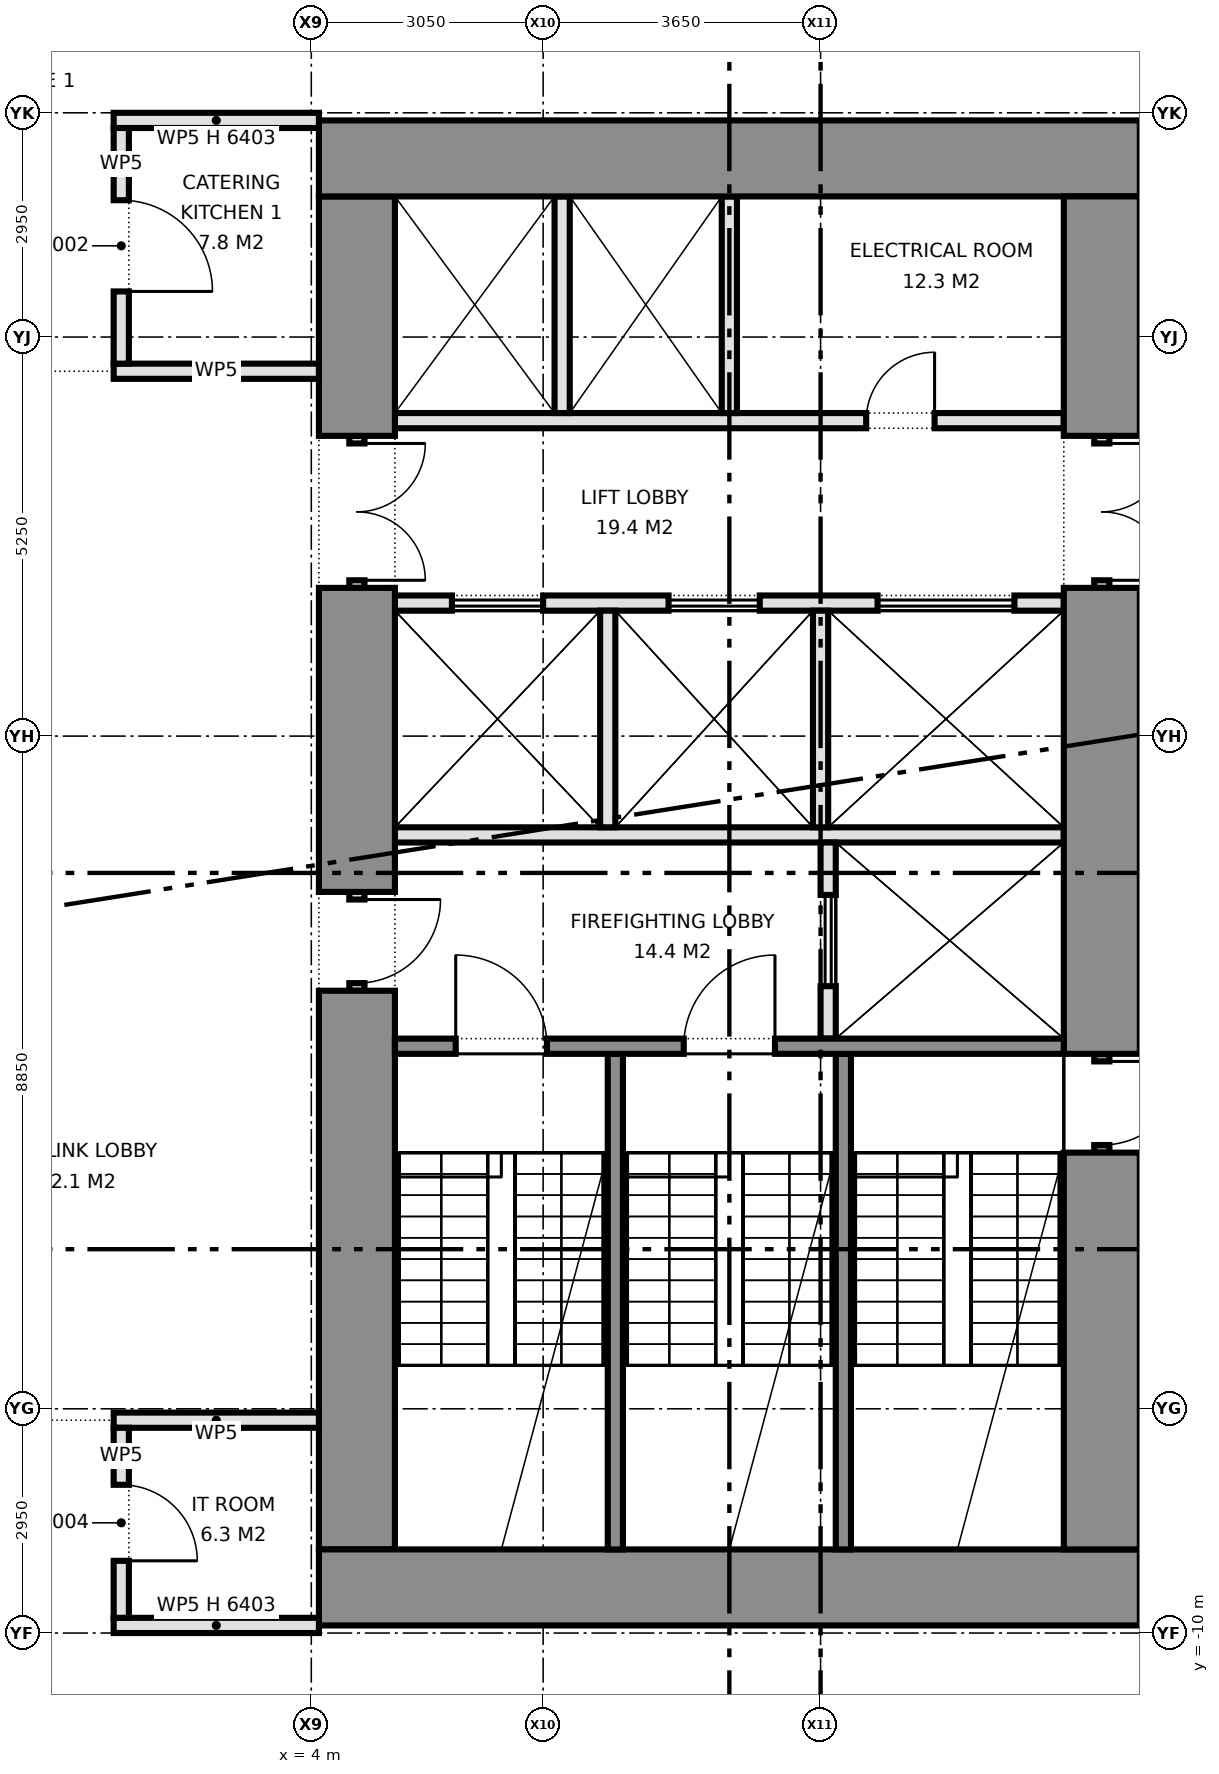
"""IFC4 building model, lengths in metres.
Left out: names, types, materials, properties, quantities, classifications, styles, units other than length and angle.
Written with IfcOpenShell. Run it as: python <this file> out.ifc"""

import sys

from ifc_helpers import new_model, si_unit, direction, frame, frame_2d, origin, place, context, subcontext, project, spatial, rectangle, extrude, element, fill, save


model = new_model("IFC4")
c1 = context("Model", 3, precision=1e-05, world=origin(), true_north=direction((0.0, 1.0)))
c2 = subcontext(c1, "Body", "Model", "MODEL_VIEW")
j1 = project(units=[si_unit("LENGTHUNIT", "METRE"), si_unit("PLANEANGLEUNIT", "RADIAN")], contexts=[c1])
p1 = place(None, origin())
s1 = spatial("IfcSite", under=j1, at=p1, CompositionType="ELEMENT")
p2 = place(p1, origin())
s2 = spatial("IfcBuilding", under=s1, at=p2, CompositionType="ELEMENT")
p3 = place(p2, frame((0.0, 0.0, 112.8)))
s3 = spatial("IfcBuildingStorey", under=s2, at=p3, CompositionType="ELEMENT", Elevation=112.8)
for number, where, z_axis, x_axis in (
    (1, (14.9, 9.4, 0.0), (0.0, 0.0, 1.0), (-1.0, 0.0, 0.0)),
    (2, (14.9, -9.4, 0.0), (0.0, 0.0, 1.0), (-1.0, 0.0, 0.0)),
):
    element("IfcWall", number, at=place(p3, frame(where, z_axis=z_axis, x_axis=x_axis)), inside=s3, PredefinedType="SHEAR", context=c2, shape_type="SweptSolid", body=[
        extrude(rectangle(XDim=10.8, YDim=1.0, at=frame_2d((5.4, 0.0))), origin(), (0.0, 0.0, 1.0), 7.35),
    ])
p4 = place(p3, frame((14.4, 8.9, 0.0), z_axis=(0.0, 0.0, 1.0), x_axis=(0.0, -1.0, 0.0)))
e3 = element("IfcWall", 3, at=p4, inside=s3, PredefinedType="SHEAR", context=c2, shape_type="SweptSolid", body=[
    extrude(rectangle(XDim=3.15, YDim=1.0, at=frame_2d((1.575, 0.0))), origin(), (0.0, 0.0, 1.0), 7.35),
])
p5 = place(p3, frame((14.4, 5.75, 0.0), z_axis=(0.0, 0.0, 1.0), x_axis=(0.0, -1.0, 0.0)))
e4 = element("IfcWall", 4, at=p5, inside=s3, PredefinedType="PARTITIONING", context=c2, shape_type="SweptSolid", body=[
    extrude(rectangle(XDim=2.0, YDim=0.2, at=frame_2d((1.0, 0.0))), origin(), (0.0, 0.0, 1.0), 2.4),
])
p6 = place(p5, frame((0.1, 0.0, 0.0)))
e5 = element("IfcOpeningElement", 5, at=p6, cuts=e4, PredefinedType="OPENING", context=c2, shape_type="SweptSolid", body=[
    extrude(rectangle(XDim=1.8, YDim=2.1, at=frame_2d((0.9, 1.05))), frame((0.0, 0.11, 0.0), z_axis=(0.0, -1.0, 0.0), x_axis=(1.0, 0.0, 0.0)), (0.0, 0.0, 1.0), 0.22),
])
p7 = place(p3, frame((14.4, 3.75, 0.0), z_axis=(0.0, 0.0, 1.0), x_axis=(0.0, -1.0, 0.0)))
e6 = element("IfcWall", 6, at=p7, inside=s3, PredefinedType="SHEAR", context=c2, shape_type="SweptSolid", body=[
    extrude(rectangle(XDim=6.13, YDim=1.0, at=frame_2d((3.065, 0.0))), origin(), (0.0, 0.0, 1.0), 7.35),
])
p8 = place(p3, frame((14.4, -2.38, 0.0), z_axis=(0.0, 0.0, 1.0), x_axis=(0.0, -1.0, 0.0)))
e7 = element("IfcWall", 7, at=p8, inside=s3, PredefinedType="SHEAR", context=c2, shape_type="SweptSolid", body=[
    extrude(rectangle(XDim=1.3, YDim=0.2, at=frame_2d((0.65, 0.0))), origin(), (0.0, 0.0, 1.0), 2.4),
])
p9 = place(p8, frame((0.1, 0.0, 0.0)))
e8 = element("IfcOpeningElement", 8, at=p9, cuts=e7, PredefinedType="OPENING", context=c2, shape_type="SweptSolid", body=[
    extrude(rectangle(XDim=1.1, YDim=2.1, at=frame_2d((0.55, 1.05))), frame((0.0, 0.11, 0.0), z_axis=(0.0, -1.0, 0.0), x_axis=(1.0, 0.0, 0.0)), (0.0, 0.0, 1.0), 0.22),
])
p10 = place(p3, frame((14.4, -3.68, 0.0), z_axis=(0.0, 0.0, 1.0), x_axis=(0.0, -1.0, 0.0)))
e9 = element("IfcWall", 9, at=p10, inside=s3, PredefinedType="SHEAR", context=c2, shape_type="SweptSolid", body=[
    extrude(rectangle(XDim=5.22, YDim=1.0, at=frame_2d((2.61, 0.0))), origin(), (0.0, 0.0, 1.0), 7.35),
])
p11 = place(p3, frame((4.6, 8.9, 0.0), z_axis=(0.0, 0.0, 1.0), x_axis=(0.0, -1.0, 0.0)))
e10 = element("IfcWall", 10, at=p11, inside=s3, PredefinedType="SHEAR", context=c2, shape_type="SweptSolid", body=[
    extrude(rectangle(XDim=3.15, YDim=1.0, at=frame_2d((1.575, 0.0))), origin(), (0.0, 0.0, 1.0), 7.35),
])
p12 = place(p3, frame((4.6, 5.75, 0.0), z_axis=(0.0, 0.0, 1.0), x_axis=(0.0, -1.0, 0.0)))
e11 = element("IfcWall", 11, at=p12, inside=s3, PredefinedType="PARTITIONING", context=c2, shape_type="SweptSolid", body=[
    extrude(rectangle(XDim=2.0, YDim=0.2, at=frame_2d((1.0, 0.0))), origin(), (0.0, 0.0, 1.0), 2.4),
])
p13 = place(p12, frame((0.1, 0.0, 0.0)))
e12 = element("IfcOpeningElement", 12, at=p13, cuts=e11, PredefinedType="OPENING", context=c2, shape_type="SweptSolid", body=[
    extrude(rectangle(XDim=1.8, YDim=2.1, at=frame_2d((0.9, 1.05))), frame((0.0, 0.11, 0.0), z_axis=(0.0, -1.0, 0.0), x_axis=(1.0, 0.0, 0.0)), (0.0, 0.0, 1.0), 0.22),
])
p14 = place(p3, frame((4.6, 3.75, 0.0), z_axis=(0.0, 0.0, 1.0), x_axis=(0.0, -1.0, 0.0)))
e13 = element("IfcWall", 13, at=p14, inside=s3, PredefinedType="SHEAR", context=c2, shape_type="SweptSolid", body=[
    extrude(rectangle(XDim=4.0, YDim=1.0, at=frame_2d((2.0, 0.0))), origin(), (0.0, 0.0, 1.0), 7.35),
])
p15 = place(p3, frame((4.6, -0.25, 0.0), z_axis=(0.0, 0.0, 1.0), x_axis=(0.0, -1.0, 0.0)))
e14 = element("IfcWall", 14, at=p15, inside=s3, PredefinedType="PARTITIONING", context=c2, shape_type="SweptSolid", body=[
    extrude(rectangle(XDim=1.3, YDim=0.2, at=frame_2d((0.65, 0.0))), origin(), (0.0, 0.0, 1.0), 2.4),
])
p16 = place(p15, frame((0.1, 0.0, 0.0)))
e15 = element("IfcOpeningElement", 15, at=p16, cuts=e14, PredefinedType="OPENING", context=c2, shape_type="SweptSolid", body=[
    extrude(rectangle(XDim=1.1, YDim=2.1, at=frame_2d((0.55, 1.05))), frame((0.0, 0.11, 0.0), z_axis=(0.0, -1.0, 0.0), x_axis=(1.0, 0.0, 0.0)), (0.0, 0.0, 1.0), 0.22),
])
p17 = place(p3, frame((4.6, -1.55, 0.0), z_axis=(0.0, 0.0, 1.0), x_axis=(0.0, -1.0, 0.0)))
e16 = element("IfcWall", 16, at=p17, inside=s3, PredefinedType="SHEAR", context=c2, shape_type="SweptSolid", body=[
    extrude(rectangle(XDim=7.35, YDim=1.0, at=frame_2d((3.675, 0.0))), origin(), (0.0, 0.0, 1.0), 7.35),
])
p18 = place(p3, frame((13.9, 5.95, 0.0), z_axis=(0.0, 0.0, 1.0), x_axis=(-1.0, 0.0, 0.0)))
e17 = element("IfcWall", 17, at=p18, inside=s3, PredefinedType="PARTITIONING", context=c2, shape_type="SweptSolid", body=[
    extrude(rectangle(XDim=8.8, YDim=0.2, at=frame_2d((4.4, 0.0))), origin(), (0.0, 0.0, 1.0), 7.35),
])
p19 = place(p18, frame((1.7, 0.0, 0.0)))
e18 = element("IfcOpeningElement", 18, at=p19, cuts=e17, PredefinedType="OPENING", context=c2, shape_type="SweptSolid", body=[
    extrude(rectangle(XDim=0.9, YDim=2.1, at=frame_2d((0.45, 1.05))), frame((0.0, 0.11, 0.0), z_axis=(0.0, -1.0, 0.0), x_axis=(1.0, 0.0, 0.0)), (0.0, 0.0, 1.0), 0.22),
])
p20 = place(p3, frame((13.9, 3.55, 0.0), z_axis=(0.0, 0.0, 1.0), x_axis=(-1.0, 0.0, 0.0)))
e19 = element("IfcWall", 19, at=p20, inside=s3, PredefinedType="PARTITIONING", context=c2, shape_type="SweptSolid", body=[
    extrude(rectangle(XDim=8.8, YDim=0.2, at=frame_2d((4.4, 0.0))), origin(), (0.0, 0.0, 1.0), 7.35),
])
p21 = place(p20, frame((0.65, 0.0, 0.0)))
e20 = element("IfcOpeningElement", 20, at=p21, cuts=e19, PredefinedType="OPENING", context=c2, shape_type="SweptSolid", body=[
    extrude(rectangle(XDim=1.8, YDim=2.1, at=frame_2d((0.9, 1.05))), frame((0.0, 0.11, 0.0), z_axis=(0.0, -1.0, 0.0), x_axis=(1.0, 0.0, 0.0)), (0.0, 0.0, 1.0), 0.22),
])
p22 = place(p20, frame((4.0, 0.0, 0.0)))
e21 = element("IfcOpeningElement", 21, at=p22, cuts=e19, PredefinedType="OPENING", context=c2, shape_type="SweptSolid", body=[
    extrude(rectangle(XDim=1.2, YDim=2.1, at=frame_2d((0.6, 1.05))), frame((0.0, 0.11, 0.0), z_axis=(0.0, -1.0, 0.0), x_axis=(1.0, 0.0, 0.0)), (0.0, 0.0, 1.0), 0.22),
])
p23 = place(p20, frame((6.85, 0.0, 0.0)))
e22 = element("IfcOpeningElement", 22, at=p23, cuts=e19, PredefinedType="OPENING", context=c2, shape_type="SweptSolid", body=[
    extrude(rectangle(XDim=1.2, YDim=2.1, at=frame_2d((0.6, 1.05))), frame((0.0, 0.11, 0.0), z_axis=(0.0, -1.0, 0.0), x_axis=(1.0, 0.0, 0.0)), (0.0, 0.0, 1.0), 0.22),
])
p24 = place(p3, frame((13.9, 0.5, 0.0), z_axis=(0.0, 0.0, 1.0), x_axis=(-1.0, 0.0, 0.0)))
e23 = element("IfcWall", 23, at=p24, inside=s3, PredefinedType="PARTITIONING", context=c2, shape_type="SweptSolid", body=[
    extrude(rectangle(XDim=8.8, YDim=0.2, at=frame_2d((4.4, 0.0))), origin(), (0.0, 0.0, 1.0), 7.35),
])
p25 = place(p3, frame((10.8, 0.4, 0.0), z_axis=(0.0, 0.0, 1.0), x_axis=(0.0, -1.0, 0.0)))
e24 = element("IfcWall", 24, at=p25, inside=s3, PredefinedType="PARTITIONING", context=c2, shape_type="SweptSolid", body=[
    extrude(rectangle(XDim=2.58, YDim=0.2, at=frame_2d((1.29, 0.0))), origin(), (0.0, 0.0, 1.0), 7.35),
])
p26 = place(p25, frame((0.69, 0.0, 0.0)))
e25 = element("IfcOpeningElement", 25, at=p26, cuts=e24, PredefinedType="OPENING", context=c2, shape_type="SweptSolid", body=[
    extrude(rectangle(XDim=1.2, YDim=2.1, at=frame_2d((0.6, 1.05))), frame((0.0, 0.11, 0.0), z_axis=(0.0, -1.0, 0.0), x_axis=(1.0, 0.0, 0.0)), (0.0, 0.0, 1.0), 0.22),
])
p27 = place(p3, frame((13.9, -2.28, 0.0), z_axis=(0.0, 0.0, 1.0), x_axis=(-1.0, 0.0, 0.0)))
e26 = element("IfcWall", 26, at=p27, inside=s3, PredefinedType="SHEAR", context=c2, shape_type="SweptSolid", body=[
    extrude(rectangle(XDim=8.8, YDim=0.2, at=frame_2d((4.4, 0.0))), origin(), (0.0, 0.0, 1.0), 7.35),
])
p28 = place(p27, frame((3.8, 0.0, 0.0)))
e27 = element("IfcOpeningElement", 27, at=p28, cuts=e26, PredefinedType="OPENING", context=c2, shape_type="SweptSolid", body=[
    extrude(rectangle(XDim=1.2, YDim=2.1, at=frame_2d((0.6, 1.05))), frame((0.0, 0.11, 0.0), z_axis=(0.0, -1.0, 0.0), x_axis=(1.0, 0.0, 0.0)), (0.0, 0.0, 1.0), 0.22),
])
p29 = place(p27, frame((6.8, 0.0, 0.0)))
e28 = element("IfcOpeningElement", 28, at=p29, cuts=e26, PredefinedType="OPENING", context=c2, shape_type="SweptSolid", body=[
    extrude(rectangle(XDim=1.2, YDim=2.1, at=frame_2d((0.6, 1.05))), frame((0.0, 0.11, 0.0), z_axis=(0.0, -1.0, 0.0), x_axis=(1.0, 0.0, 0.0)), (0.0, 0.0, 1.0), 0.22),
])
for number, where, z_axis, x_axis in (
    (29, (11.0, -2.38, 0.0), (0.0, 0.0, 1.0), (0.0, -1.0, 0.0)),
    (30, (8.0, -2.38, 0.0), (0.0, 0.0, 1.0), (0.0, -1.0, 0.0)),
):
    element("IfcWall", number, at=place(p3, frame(where, z_axis=z_axis, x_axis=x_axis)), inside=s3, PredefinedType="SHEAR", context=c2, shape_type="SweptSolid", body=[
        extrude(rectangle(XDim=6.52, YDim=0.2, at=frame_2d((3.26, 0.0))), origin(), (0.0, 0.0, 1.0), 7.35),
    ])
for number, where, z_axis, x_axis in (
    (31, (9.5, 8.9, 0.0), (0.0, 0.0, 1.0), (0.0, -1.0, 0.0)),
    (32, (7.3, 8.9, 0.0), (0.0, 0.0, 1.0), (0.0, -1.0, 0.0)),
    (33, (10.7, 3.45, 0.0), (0.0, 0.0, 1.0), (0.0, -1.0, 0.0)),
    (34, (7.9, 3.45, 0.0), (0.0, 0.0, 1.0), (0.0, -1.0, 0.0)),
):
    element("IfcWall", number, at=place(p3, frame(where, z_axis=z_axis, x_axis=x_axis)), inside=s3, PredefinedType="PARTITIONING", context=c2, shape_type="SweptSolid", body=[
        extrude(rectangle(XDim=2.85, YDim=0.2, at=frame_2d((1.425, 0.0))), origin(), (0.0, 0.0, 1.0), 7.35),
    ])
p30 = place(p3, frame((1.4, -9.9, 0.0), z_axis=(0.0, 0.0, 1.0), x_axis=(1.0, 0.0, 0.0)))
e35 = element("IfcWall", 35, at=p30, inside=s3, PredefinedType="PARTITIONING", context=c2, shape_type="SweptSolid", body=[
    extrude(rectangle(XDim=2.7, YDim=0.2, at=frame_2d((1.35, 0.0))), origin(), (0.0, 0.0, 1.0), 6.403),
])
for number, where, z_axis, x_axis in (
    (36, (1.4, -7.2, 0.0), (0.0, 0.0, 1.0), (1.0, 0.0, 0.0)),
    (37, (1.4, 6.6, 0.0), (0.0, 0.0, 1.0), (1.0, 0.0, 0.0)),
):
    element("IfcWall", number, at=place(p3, frame(where, z_axis=z_axis, x_axis=x_axis)), inside=s3, PredefinedType="PARTITIONING", context=c2, shape_type="SweptSolid", body=[
        extrude(rectangle(XDim=2.7, YDim=0.2, at=frame_2d((1.35, 0.0))), origin(), (0.0, 0.0, 1.0), 7.35),
    ])
p31 = place(p3, frame((1.4, 9.9, 0.0), z_axis=(0.0, 0.0, 1.0), x_axis=(1.0, 0.0, 0.0)))
e38 = element("IfcWall", 38, at=p31, inside=s3, PredefinedType="PARTITIONING", context=c2, shape_type="SweptSolid", body=[
    extrude(rectangle(XDim=2.7, YDim=0.2, at=frame_2d((1.35, 0.0))), origin(), (0.0, 0.0, 1.0), 6.403),
])
p32 = place(p3, frame((1.5, -9.8, 0.0), z_axis=(0.0, 0.0, 1.0), x_axis=(0.0, 1.0, 0.0)))
e39 = element("IfcWall", 39, at=p32, inside=s3, PredefinedType="PARTITIONING", context=c2, shape_type="SweptSolid", body=[
    extrude(rectangle(XDim=2.5, YDim=0.2, at=frame_2d((1.25, 0.0))), origin(), (0.0, 0.0, 1.0), 7.35),
])
p33 = place(p32, frame((0.75, 0.0, 0.0)))
e40 = element("IfcOpeningElement", 40, at=p33, cuts=e39, PredefinedType="OPENING", context=c2, shape_type="SweptSolid", body=[
    extrude(rectangle(XDim=1.0, YDim=2.1, at=frame_2d((0.5, 1.05))), frame((0.0, 0.11, 0.0), z_axis=(0.0, -1.0, 0.0), x_axis=(1.0, 0.0, 0.0)), (0.0, 0.0, 1.0), 0.22),
])
p34 = place(p3, frame((1.5, 6.7, 0.0), z_axis=(0.0, 0.0, 1.0), x_axis=(0.0, 1.0, 0.0)))
e41 = element("IfcWall", 41, at=p34, inside=s3, PredefinedType="PARTITIONING", context=c2, shape_type="SweptSolid", body=[
    extrude(rectangle(XDim=3.1, YDim=0.2, at=frame_2d((1.55, 0.0))), origin(), (0.0, 0.0, 1.0), 7.35),
])
p35 = place(p34, frame((0.95, 0.0, 0.0)))
e42 = element("IfcOpeningElement", 42, at=p35, cuts=e41, PredefinedType="OPENING", context=c2, shape_type="SweptSolid", body=[
    extrude(rectangle(XDim=1.2, YDim=2.1, at=frame_2d((0.6, 1.05))), frame((0.0, 0.11, 0.0), z_axis=(0.0, -1.0, 0.0), x_axis=(1.0, 0.0, 0.0)), (0.0, 0.0, 1.0), 0.22),
])
p36 = place(p6, origin())
e43 = element("IfcDoor", 43, at=p36, inside=s3, OperationType="DOUBLE_DOOR_SINGLE_SWING", PredefinedType="DOOR", context=c2, shape_type="SweptSolid", body=[
    extrude(rectangle(XDim=1.8, YDim=2.1, at=frame_2d((0.9, 1.05))), frame((0.0, 0.025, 0.0), z_axis=(0.0, -1.0, 0.0), x_axis=(1.0, 0.0, 0.0)), (0.0, 0.0, 1.0), 0.05),
])
fill(e5, e43)
p37 = place(p9, origin())
e44 = element("IfcDoor", 44, at=p37, inside=s3, OperationType="SINGLE_SWING_LEFT", PredefinedType="DOOR", context=c2, shape_type="SweptSolid", body=[
    extrude(rectangle(XDim=1.1, YDim=2.1, at=frame_2d((0.55, 1.05))), frame((0.0, 0.025, 0.0), z_axis=(0.0, -1.0, 0.0), x_axis=(1.0, 0.0, 0.0)), (0.0, 0.0, 1.0), 0.05),
])
fill(e8, e44)
p38 = place(p13, origin())
e45 = element("IfcDoor", 45, at=p38, inside=s3, OperationType="DOUBLE_DOOR_SINGLE_SWING", PredefinedType="DOOR", context=c2, shape_type="SweptSolid", body=[
    extrude(rectangle(XDim=1.8, YDim=2.1, at=frame_2d((0.9, 1.05))), frame((0.0, 0.025, 0.0), z_axis=(0.0, -1.0, 0.0), x_axis=(1.0, 0.0, 0.0)), (0.0, 0.0, 1.0), 0.05),
])
fill(e12, e45)
p39 = place(p16, origin())
e46 = element("IfcDoor", 46, at=p39, inside=s3, OperationType="SINGLE_SWING_LEFT", PredefinedType="DOOR", context=c2, shape_type="SweptSolid", body=[
    extrude(rectangle(XDim=1.1, YDim=2.1, at=frame_2d((0.55, 1.05))), frame((0.0, 0.025, 0.0), z_axis=(0.0, -1.0, 0.0), x_axis=(1.0, 0.0, 0.0)), (0.0, 0.0, 1.0), 0.05),
])
fill(e15, e46)
p40 = place(p21, origin())
e47 = element("IfcDoor", 47, at=p40, inside=s3, OperationType="DOUBLE_DOOR_SLIDING", PredefinedType="DOOR", context=c2, shape_type="SweptSolid", body=[
    extrude(rectangle(XDim=1.8, YDim=2.1, at=frame_2d((0.9, 1.05))), frame((0.0, 0.025, 0.0), z_axis=(0.0, -1.0, 0.0), x_axis=(1.0, 0.0, 0.0)), (0.0, 0.0, 1.0), 0.05),
])
fill(e20, e47)
p41 = place(p22, origin())
e48 = element("IfcDoor", 48, at=p41, inside=s3, OperationType="DOUBLE_DOOR_SLIDING", PredefinedType="DOOR", context=c2, shape_type="SweptSolid", body=[
    extrude(rectangle(XDim=1.2, YDim=2.1, at=frame_2d((0.6, 1.05))), frame((0.0, 0.025, 0.0), z_axis=(0.0, -1.0, 0.0), x_axis=(1.0, 0.0, 0.0)), (0.0, 0.0, 1.0), 0.05),
])
fill(e21, e48)
p42 = place(p23, origin())
e49 = element("IfcDoor", 49, at=p42, inside=s3, OperationType="DOUBLE_DOOR_SLIDING", PredefinedType="DOOR", context=c2, shape_type="SweptSolid", body=[
    extrude(rectangle(XDim=1.2, YDim=2.1, at=frame_2d((0.6, 1.05))), frame((0.0, 0.025, 0.0), z_axis=(0.0, -1.0, 0.0), x_axis=(1.0, 0.0, 0.0)), (0.0, 0.0, 1.0), 0.05),
])
fill(e22, e49)
p43 = place(p26, origin())
e50 = element("IfcDoor", 50, at=p43, inside=s3, OperationType="DOUBLE_DOOR_SLIDING", PredefinedType="DOOR", context=c2, shape_type="SweptSolid", body=[
    extrude(rectangle(XDim=1.2, YDim=2.1, at=frame_2d((0.6, 1.05))), frame((0.0, 0.025, 0.0), z_axis=(0.0, -1.0, 0.0), x_axis=(1.0, 0.0, 0.0)), (0.0, 0.0, 1.0), 0.05),
])
fill(e25, e50)
p44 = place(p19, frame((0.9, 0.0, 0.0), z_axis=(0.0, 0.0, 1.0), x_axis=(-1.0, 0.0, 0.0)))
e51 = element("IfcDoor", 51, at=p44, inside=s3, OperationType="SINGLE_SWING_RIGHT", PredefinedType="DOOR", context=c2, shape_type="SweptSolid", body=[
    extrude(rectangle(XDim=0.9, YDim=2.1, at=frame_2d((0.45, 1.05))), frame((0.0, 0.025, 0.0), z_axis=(0.0, -1.0, 0.0), x_axis=(1.0, 0.0, 0.0)), (0.0, 0.0, 1.0), 0.05),
])
fill(e18, e51)
p45 = place(p28, frame((1.2, 0.0, 0.0), z_axis=(0.0, 0.0, 1.0), x_axis=(-1.0, 0.0, 0.0)))
e52 = element("IfcDoor", 52, at=p45, inside=s3, OperationType="SINGLE_SWING_RIGHT", PredefinedType="DOOR", context=c2, shape_type="SweptSolid", body=[
    extrude(rectangle(XDim=1.2, YDim=2.1, at=frame_2d((0.6, 1.05))), frame((0.0, 0.025, 0.0), z_axis=(0.0, -1.0, 0.0), x_axis=(1.0, 0.0, 0.0)), (0.0, 0.0, 1.0), 0.05),
])
fill(e27, e52)
p46 = place(p29, frame((1.2, 0.0, 0.0), z_axis=(0.0, 0.0, 1.0), x_axis=(-1.0, 0.0, 0.0)))
e53 = element("IfcDoor", 53, at=p46, inside=s3, OperationType="SINGLE_SWING_LEFT", PredefinedType="DOOR", context=c2, shape_type="SweptSolid", body=[
    extrude(rectangle(XDim=1.2, YDim=2.1, at=frame_2d((0.6, 1.05))), frame((0.0, 0.025, 0.0), z_axis=(0.0, -1.0, 0.0), x_axis=(1.0, 0.0, 0.0)), (0.0, 0.0, 1.0), 0.05),
])
fill(e28, e53)
p47 = place(p35, frame((1.2, 0.0, 0.0), z_axis=(0.0, 0.0, 1.0), x_axis=(-1.0, 0.0, 0.0)))
e54 = element("IfcDoor", 54, at=p47, inside=s3, OperationType="SINGLE_SWING_RIGHT", PredefinedType="DOOR", context=c2, shape_type="SweptSolid", body=[
    extrude(rectangle(XDim=1.2, YDim=2.1, at=frame_2d((0.6, 1.05))), frame((0.0, 0.025, 0.0), z_axis=(0.0, -1.0, 0.0), x_axis=(1.0, 0.0, 0.0)), (0.0, 0.0, 1.0), 0.05),
])
fill(e42, e54)
p48 = place(p33, frame((1.0, 0.0, 0.0), z_axis=(0.0, 0.0, 1.0), x_axis=(-1.0, 0.0, 0.0)))
e55 = element("IfcDoor", 55, at=p48, inside=s3, OperationType="SINGLE_SWING_RIGHT", PredefinedType="DOOR", context=c2, shape_type="SweptSolid", body=[
    extrude(rectangle(XDim=1.0, YDim=2.1, at=frame_2d((0.5, 1.05))), frame((0.0, 0.025, 0.0), z_axis=(0.0, -1.0, 0.0), x_axis=(1.0, 0.0, 0.0)), (0.0, 0.0, 1.0), 0.05),
])
fill(e40, e55)
save(model, sys.argv[1])
